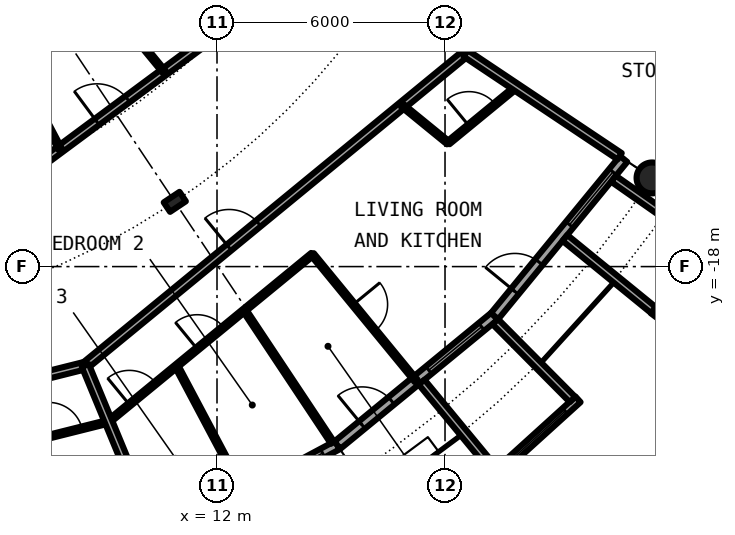
"""IFC4 building model, lengths in metres.
Left out: names, types, materials, properties, quantities, classifications, styles, units other than length and angle.
Written with IfcOpenShell. Run it as: python <this file> out.ifc"""

import sys

from ifc_helpers import new_model, si_unit, direction, frame, frame_2d, origin, origin_2d, place, context, subcontext, project, spatial, rectangle, circle, hollow_circle, i_section, extrude, element, fill, save


model = new_model("IFC4")
c1 = context("Model", 3, precision=1e-05, world=origin(), true_north=direction((0.0, 1.0)))
c2 = subcontext(c1, "Body", "Model", "MODEL_VIEW")
j1 = project(units=[si_unit("LENGTHUNIT", "METRE"), si_unit("PLANEANGLEUNIT", "RADIAN")], contexts=[c1])
p1 = place(None, origin())
s1 = spatial("IfcSite", under=j1, at=p1, CompositionType="ELEMENT")
p2 = place(p1, origin())
s2 = spatial("IfcBuilding", under=s1, at=p2, CompositionType="ELEMENT")
p3 = place(p2, frame((0.0, 0.0, 154.35)))
s3 = spatial("IfcBuildingStorey", under=s2, at=p3, CompositionType="ELEMENT", Elevation=154.35)
p4 = place(p3, frame((23.448, -15.667, 0.0), z_axis=(0.0, 0.0, 1.0), x_axis=(1.0, 0.0, 0.0)))
e1 = element("IfcColumn", 1, at=p4, inside=s3, PredefinedType="COLUMN", context=c2, shape_type="SweptSolid", body=[
    extrude(hollow_circle(Radius=0.406, WallThickness=0.04, at=origin_2d()), origin(), (0.0, 0.0, 1.0), 3.05),
])
p5 = place(p3, frame((10.889, -16.297, 0.0), z_axis=(0.0, 0.0, 1.0), x_axis=(0.55557023302, -0.831469612303, 0.0)))
e2 = element("IfcColumn", 2, at=p5, inside=s3, PredefinedType="COLUMN", context=c2, shape_type="SweptSolid", body=[
    extrude(i_section(OverallWidth=0.3, OverallDepth=0.5, WebThickness=0.014, FlangeThickness=0.028, FilletRadius=0.027, at=origin_2d()), origin(), (0.0, 0.0, 1.0), 3.05),
])
p6 = place(p3, frame((10.447, -25.222, 0.0), z_axis=(0.0, 0.0, 1.0), x_axis=(0.881915646801, 0.471407246368, 0.0)))
e3 = element("IfcWall", 3, at=p6, inside=s3, PredefinedType="SOLIDWALL", context=c2, shape_type="SweptSolid", body=[
    extrude(rectangle(XDim=5.352, YDim=0.25, at=frame_2d((2.676, 0.0))), origin(), (0.0, 0.0, 1.0), 2.7),
])
p7 = place(p6, frame((0.841, 0.0, 0.0)))
e4 = element("IfcOpeningElement", 4, at=p7, cuts=e3, PredefinedType="OPENING", context=c2, shape_type="SweptSolid", body=[
    extrude(rectangle(XDim=1.0, YDim=2.2, at=frame_2d((0.5, 1.1))), frame((0.0, 0.135, 0.0), z_axis=(0.0, -1.0, 0.0), x_axis=(1.0, 0.0, 0.0)), (0.0, 0.0, 1.0), 0.27),
])
p8 = place(p6, frame((3.111, 0.0, 0.3)))
e5 = element("IfcOpeningElement", 5, at=p8, cuts=e3, PredefinedType="OPENING", context=c2, shape_type="SweptSolid", body=[
    extrude(rectangle(XDim=1.8, YDim=2.1, at=frame_2d((0.9, 1.05))), frame((0.0, 0.135, 0.0), z_axis=(0.0, -1.0, 0.0), x_axis=(1.0, 0.0, 0.0)), (0.0, 0.0, 1.0), 0.27),
])
p9 = place(p3, frame((15.167, -22.699, 0.0), z_axis=(0.0, 0.0, 1.0), x_axis=(0.773019449054, 0.634382322723, 0.0)))
e6 = element("IfcWall", 6, at=p9, inside=s3, PredefinedType="SOLIDWALL", context=c2, shape_type="SweptSolid", body=[
    extrude(rectangle(XDim=5.352, YDim=0.25, at=frame_2d((2.676, 0.0))), origin(), (0.0, 0.0, 1.0), 2.7),
])
p10 = place(p9, frame((0.841, 0.0, 0.0)))
e7 = element("IfcOpeningElement", 7, at=p10, cuts=e6, PredefinedType="OPENING", context=c2, shape_type="SweptSolid", body=[
    extrude(rectangle(XDim=1.0, YDim=2.2, at=frame_2d((0.5, 1.1))), frame((0.0, 0.135, 0.0), z_axis=(0.0, -1.0, 0.0), x_axis=(1.0, 0.0, 0.0)), (0.0, 0.0, 1.0), 0.27),
])
p11 = place(p9, frame((3.111, 0.0, 0.3)))
e8 = element("IfcOpeningElement", 8, at=p11, cuts=e6, PredefinedType="OPENING", context=c2, shape_type="SweptSolid", body=[
    extrude(rectangle(XDim=1.8, YDim=2.1, at=frame_2d((0.9, 1.05))), frame((0.0, 0.135, 0.0), z_axis=(0.0, -1.0, 0.0), x_axis=(1.0, 0.0, 0.0)), (0.0, 0.0, 1.0), 0.27),
])
p12 = place(p3, frame((19.282, -23.503, -0.03), z_axis=(0.0, 0.0, 1.0), x_axis=(0.740998365753, 0.671506829416, 0.0)))
e9 = element("IfcWall", 9, at=p12, inside=s3, PredefinedType="SOLIDWALL", context=c2, shape_type="SweptSolid", body=[
    extrude(rectangle(XDim=2.993, YDim=0.2, at=frame_2d((1.497, 0.0))), origin(), (0.0, 0.0, 1.0), 2.73),
])
p13 = place(p12, frame((0.457, 0.0, 0.33)))
e10 = element("IfcOpeningElement", 10, at=p13, cuts=e9, PredefinedType="OPENING", context=c2, shape_type="SweptSolid", body=[
    extrude(circle(Radius=1.04, at=frame_2d((1.04, 1.04))), frame((0.0, 0.11, 0.0), z_axis=(0.0, -1.0, 0.0), x_axis=(1.0, 0.0, 0.0)), (0.0, 0.0, 1.0), 0.22),
])
p14 = place(p3, frame((17.384, -21.041, -0.03), z_axis=(0.0, 0.0, 1.0), x_axis=(0.63709551667, -0.770784861449, 0.0)))
e11 = element("IfcWall", 11, at=p14, inside=s3, PredefinedType="SOLIDWALL", context=c2, shape_type="SweptSolid", body=[
    extrude(rectangle(XDim=3.006, YDim=0.2, at=frame_2d((1.503, 0.0))), origin(), (0.0, 0.0, 1.0), 2.73),
])
p15 = place(p3, frame((19.323, -19.45, -0.03), z_axis=(0.0, 0.0, 1.0), x_axis=(0.704476739375, -0.709727076896, 0.0)))
e12 = element("IfcWall", 12, at=p15, inside=s3, PredefinedType="SOLIDWALL", context=c2, shape_type="SweptSolid", body=[
    extrude(rectangle(XDim=2.883, YDim=0.2, at=frame_2d((1.441, 0.0))), origin(), (0.0, 0.0, 1.0), 2.73),
])
p16 = place(p3, frame((19.304, -19.304, 0.0), z_axis=(0.0, 0.0, 1.0), x_axis=(0.634382322723, 0.773019449054, 0.0)))
e13 = element("IfcWall", 13, at=p16, inside=s3, PredefinedType="SOLIDWALL", context=c2, shape_type="SweptSolid", body=[
    extrude(rectangle(XDim=5.352, YDim=0.25, at=frame_2d((2.676, 0.0))), origin(), (0.0, 0.0, 1.0), 2.7),
])
p17 = place(p16, frame((0.841, 0.0, 0.0)))
e14 = element("IfcOpeningElement", 14, at=p17, cuts=e13, PredefinedType="OPENING", context=c2, shape_type="SweptSolid", body=[
    extrude(rectangle(XDim=1.0, YDim=2.2, at=frame_2d((0.5, 1.1))), frame((0.0, 0.135, 0.0), z_axis=(0.0, -1.0, 0.0), x_axis=(1.0, 0.0, 0.0)), (0.0, 0.0, 1.0), 0.27),
])
p18 = place(p16, frame((3.111, 0.0, 0.3)))
e15 = element("IfcOpeningElement", 15, at=p18, cuts=e13, PredefinedType="OPENING", context=c2, shape_type="SweptSolid", body=[
    extrude(rectangle(XDim=1.8, YDim=2.1, at=frame_2d((0.9, 1.05))), frame((0.0, 0.135, 0.0), z_axis=(0.0, -1.0, 0.0), x_axis=(1.0, 0.0, 0.0)), (0.0, 0.0, 1.0), 0.27),
])
p19 = place(p3, frame((23.497, -19.289, -0.03), z_axis=(0.0, 0.0, 1.0), x_axis=(0.602806268067, 0.797887588059, 0.0)))
e16 = element("IfcWall", 16, at=p19, inside=s3, PredefinedType="SOLIDWALL", context=c2, shape_type="SweptSolid", body=[
    extrude(rectangle(XDim=2.447, YDim=0.2, at=frame_2d((1.223, 0.0))), origin(), (0.0, 0.0, 1.0), 2.73),
])
p20 = place(p19, frame((0.183, 0.0, 0.33)))
e17 = element("IfcOpeningElement", 17, at=p20, cuts=e16, PredefinedType="OPENING", context=c2, shape_type="SweptSolid", body=[
    extrude(circle(Radius=1.04, at=frame_2d((1.04, 1.04))), frame((0.0, 0.11, 0.0), z_axis=(0.0, -1.0, 0.0), x_axis=(1.0, 0.0, 0.0)), (0.0, 0.0, 1.0), 0.22),
])
p21 = place(p3, frame((21.155, -17.246, -0.03), z_axis=(0.0, 0.0, 1.0), x_axis=(0.775179004516, -0.631741648902, 0.0)))
e18 = element("IfcWall", 18, at=p21, inside=s3, PredefinedType="SOLIDWALL", context=c2, shape_type="SweptSolid", body=[
    extrude(rectangle(XDim=3.006, YDim=0.2, at=frame_2d((1.503, 0.0))), origin(), (0.0, 0.0, 1.0), 2.73),
])
p22 = place(p3, frame((22.433, -15.688, -0.03), z_axis=(0.0, 0.0, 1.0), x_axis=(0.819373043115, -0.573260687834, 0.0)))
e19 = element("IfcWall", 19, at=p22, inside=s3, PredefinedType="SOLIDWALL", context=c2, shape_type="SweptSolid", body=[
    extrude(rectangle(XDim=2.925, YDim=0.2, at=frame_2d((1.463, 0.0))), origin(), (0.0, 0.0, 1.0), 2.73),
])
p23 = place(p3, frame((6.878, -22.649, 0.0), z_axis=(0.0, 0.0, 1.0), x_axis=(0.9700564467, 0.242879579658, 0.0)))
e20 = element("IfcWall", 20, at=p23, inside=s3, PredefinedType="PARTITIONING", context=c2, shape_type="SweptSolid", body=[
    extrude(rectangle(XDim=2.338, YDim=0.1, at=frame_2d((1.169, 0.0))), origin(), (0.0, 0.0, 1.0), 2.7),
])
p24 = place(p23, frame((0.719, 0.0, 0.0)))
e21 = element("IfcOpeningElement", 21, at=p24, cuts=e20, PredefinedType="OPENING", context=c2, shape_type="SweptSolid", body=[
    extrude(rectangle(XDim=0.9, YDim=2.3, at=frame_2d((0.45, 1.15))), frame((0.0, 0.06, 0.0), z_axis=(0.0, -1.0, 0.0), x_axis=(1.0, 0.0, 0.0)), (0.0, 0.0, 1.0), 0.12),
])
p25 = place(p3, frame((9.146, -22.081, 0.0), z_axis=(0.0, 0.0, 1.0), x_axis=(0.772956112865, 0.634459492469, 0.0)))
e22 = element("IfcWall", 22, at=p25, inside=s3, PredefinedType="PARTITIONING", context=c2, shape_type="SweptSolid", body=[
    extrude(rectangle(XDim=6.938, YDim=0.1, at=frame_2d((3.469, 0.0))), origin(), (0.0, 0.0, 1.0), 2.7),
])
p26 = place(p25, frame((3.018, 0.0, 0.0)))
e23 = element("IfcOpeningElement", 23, at=p26, cuts=e22, PredefinedType="OPENING", context=c2, shape_type="SweptSolid", body=[
    extrude(rectangle(XDim=0.9, YDim=2.3, at=frame_2d((0.45, 1.15))), frame((0.0, 0.06, 0.0), z_axis=(0.0, -1.0, 0.0), x_axis=(1.0, 0.0, 0.0)), (0.0, 0.0, 1.0), 0.12),
])
p27 = place(p25, frame((0.709, 0.0, 0.0)))
e24 = element("IfcOpeningElement", 24, at=p27, cuts=e22, PredefinedType="OPENING", context=c2, shape_type="SweptSolid", body=[
    extrude(rectangle(XDim=0.9, YDim=2.3, at=frame_2d((0.45, 1.15))), frame((0.0, 0.06, 0.0), z_axis=(0.0, -1.0, 0.0), x_axis=(1.0, 0.0, 0.0)), (0.0, 0.0, 1.0), 0.12),
])
p28 = place(p3, frame((18.087, -14.742, 0.0), z_axis=(0.0, 0.0, 1.0), x_axis=(0.77288890179, 0.634541366256, 0.0)))
e25 = element("IfcWall", 25, at=p28, inside=s3, PredefinedType="PARTITIONING", context=c2, shape_type="SweptSolid", body=[
    extrude(rectangle(XDim=2.313, YDim=0.1, at=frame_2d((1.157, 0.0))), origin(), (0.0, 0.0, 1.0), 2.7),
])
p29 = place(p28, frame((0.702, 0.0, 0.0)))
e26 = element("IfcOpeningElement", 26, at=p29, cuts=e25, PredefinedType="OPENING", context=c2, shape_type="SweptSolid", body=[
    extrude(rectangle(XDim=0.9, YDim=2.3, at=frame_2d((0.45, 1.15))), frame((0.0, 0.06, 0.0), z_axis=(0.0, -1.0, 0.0), x_axis=(1.0, 0.0, 0.0)), (0.0, 0.0, 1.0), 0.12),
])
p30 = place(p3, frame((18.542, -12.389, 0.0), z_axis=(0.0, 0.0, 1.0), x_axis=(0.465605550524, 0.884992356646, 0.0)))
e27 = element("IfcWall", 27, at=p30, inside=s3, PredefinedType="PARTITIONING", context=c2, shape_type="SweptSolid", body=[
    extrude(rectangle(XDim=1.643, YDim=0.2, at=frame_2d((0.821, 0.0))), origin(), (0.0, 0.0, 1.0), 2.7),
])
p31 = place(p3, frame((2.186, -22.193, 0.0), z_axis=(0.0, 0.0, 1.0), x_axis=(0.97003047456, 0.242983288366, 0.0)))
e28 = element("IfcWall", 28, at=p31, inside=s3, PredefinedType="PARTITIONING", context=c2, shape_type="SweptSolid", body=[
    extrude(rectangle(XDim=6.544, YDim=0.2, at=frame_2d((3.272, 0.0))), origin(), (0.0, 0.0, 1.0), 2.7),
])
p32 = place(p31, frame((1.681, 0.0, 0.0)))
e29 = element("IfcOpeningElement", 29, at=p32, cuts=e28, PredefinedType="OPENING", context=c2, shape_type="SweptSolid", body=[
    extrude(rectangle(XDim=1.0, YDim=2.3, at=frame_2d((0.5, 1.15))), frame((0.0, 0.11, 0.0), z_axis=(0.0, -1.0, 0.0), x_axis=(1.0, 0.0, 0.0)), (0.0, 0.0, 1.0), 0.22),
])
p33 = place(p3, frame((8.534, -20.603, 0.0), z_axis=(0.0, 0.0, 1.0), x_axis=(0.772983503654, 0.634426121056, 0.0)))
e30 = element("IfcWall", 30, at=p33, inside=s3, PredefinedType="PARTITIONING", context=c2, shape_type="SweptSolid", body=[
    extrude(rectangle(XDim=12.947, YDim=0.2, at=frame_2d((6.474, 0.0))), origin(), (0.0, 0.0, 1.0), 2.7),
])
p34 = place(p33, frame((4.895, 0.0, 0.0)))
e31 = element("IfcOpeningElement", 31, at=p34, cuts=e30, PredefinedType="OPENING", context=c2, shape_type="SweptSolid", body=[
    extrude(rectangle(XDim=1.0, YDim=2.3, at=frame_2d((0.5, 1.15))), frame((0.0, 0.11, 0.0), z_axis=(0.0, -1.0, 0.0), x_axis=(1.0, 0.0, 0.0)), (0.0, 0.0, 1.0), 0.22),
])
p35 = place(p3, frame((5.137, -16.938, 0.0), z_axis=(0.0, 0.0, 1.0), x_axis=(0.803229232922, 0.595670042371, 0.0)))
e32 = element("IfcWall", 32, at=p35, inside=s3, PredefinedType="PARTITIONING", context=c2, shape_type="SweptSolid", body=[
    extrude(rectangle(XDim=10.224, YDim=0.2, at=frame_2d((5.112, 0.0))), origin(), (0.0, 0.0, 1.0), 2.7),
])
p36 = place(p35, frame((4.612, 0.0, 0.0)))
e33 = element("IfcOpeningElement", 33, at=p36, cuts=e32, PredefinedType="OPENING", context=c2, shape_type="SweptSolid", body=[
    extrude(rectangle(XDim=1.0, YDim=2.3, at=frame_2d((0.5, 1.15))), frame((0.0, 0.11, 0.0), z_axis=(0.0, -1.0, 0.0), x_axis=(1.0, 0.0, 0.0)), (0.0, 0.0, 1.0), 0.22),
])
p37 = place(p3, frame((12.721, -19.147, 0.0), z_axis=(0.0, 0.0, 1.0), x_axis=(0.553609857728, -0.832776155654, 0.0)))
e34 = element("IfcWall", 34, at=p37, inside=s3, PredefinedType="PARTITIONING", context=c2, shape_type="SweptSolid", body=[
    extrude(rectangle(XDim=4.187, YDim=0.1, at=frame_2d((2.094, 0.0))), origin(), (0.0, 0.0, 1.0), 2.7),
])
p38 = place(p3, frame((4.908, -5.959, 0.0), z_axis=(0.0, 0.0, 1.0), x_axis=(0.636115614725, -0.771593756262, 0.0)))
e35 = element("IfcWall", 35, at=p38, inside=s3, PredefinedType="PARTITIONING", context=c2, shape_type="SweptSolid", body=[
    extrude(rectangle(XDim=8.967, YDim=0.1, at=frame_2d((4.483, 0.0))), origin(), (0.0, 0.0, 1.0), 2.7),
])
p39 = place(p38, frame((6.4, 0.0, 0.0)))
e36 = element("IfcOpeningElement", 36, at=p39, cuts=e35, PredefinedType="OPENING", context=c2, shape_type="SweptSolid", body=[
    extrude(rectangle(XDim=0.9, YDim=2.3, at=frame_2d((0.45, 1.15))), frame((0.0, 0.06, 0.0), z_axis=(0.0, -1.0, 0.0), x_axis=(1.0, 0.0, 0.0)), (0.0, 0.0, 1.0), 0.12),
])
p40 = place(p38, frame((1.917, 0.0, 0.0)))
e37 = element("IfcOpeningElement", 37, at=p40, cuts=e35, PredefinedType="OPENING", context=c2, shape_type="SweptSolid", body=[
    extrude(rectangle(XDim=0.9, YDim=2.3, at=frame_2d((0.45, 1.15))), frame((0.0, 0.06, 0.0), z_axis=(0.0, -1.0, 0.0), x_axis=(1.0, 0.0, 0.0)), (0.0, 0.0, 1.0), 0.12),
])
p41 = place(p3, frame((5.875, -11.126, 0.0), z_axis=(0.0, 0.0, 1.0), x_axis=(0.467030118529, -0.884241408432, 0.0)))
e38 = element("IfcWall", 38, at=p41, inside=s3, PredefinedType="PARTITIONING", context=c2, shape_type="SweptSolid", body=[
    extrude(rectangle(XDim=4.278, YDim=0.1, at=frame_2d((2.139, 0.0))), origin(), (0.0, 0.0, 1.0), 2.7),
])
p42 = place(p41, frame((1.689, 0.0, 0.0)))
e39 = element("IfcOpeningElement", 39, at=p42, cuts=e38, PredefinedType="OPENING", context=c2, shape_type="SweptSolid", body=[
    extrude(rectangle(XDim=0.9, YDim=2.3, at=frame_2d((0.45, 1.15))), frame((0.0, 0.06, 0.0), z_axis=(0.0, -1.0, 0.0), x_axis=(1.0, 0.0, 0.0)), (0.0, 0.0, 1.0), 0.12),
])
p43 = place(p3, frame((8.534, -20.603, 0.0), z_axis=(0.0, 0.0, 1.0), x_axis=(0.382651153718, -0.923892902104, 0.0)))
e40 = element("IfcWall", 40, at=p43, inside=s3, PredefinedType="PARTITIONING", context=c2, shape_type="SweptSolid", body=[
    extrude(rectangle(XDim=4.874, YDim=0.2, at=frame_2d((2.437, 0.0))), origin(), (0.0, 0.0, 1.0), 2.7),
])
p44 = place(p3, frame((10.934, -20.614, 0.0), z_axis=(0.0, 0.0, 1.0), x_axis=(0.468594334564, -0.883413464701, 0.0)))
e41 = element("IfcWall", 41, at=p44, inside=s3, PredefinedType="PARTITIONING", context=c2, shape_type="SweptSolid", body=[
    extrude(rectangle(XDim=3.841, YDim=0.1, at=frame_2d((1.92, 0.0))), origin(), (0.0, 0.0, 1.0), 2.7),
])
p45 = place(p3, frame((14.509, -17.679, 0.0), z_axis=(0.0, 0.0, 1.0), x_axis=(0.634342681687, -0.77305197897, 0.0)))
e42 = element("IfcWall", 42, at=p45, inside=s3, PredefinedType="PARTITIONING", context=c2, shape_type="SweptSolid", body=[
    extrude(rectangle(XDim=4.305, YDim=0.1, at=frame_2d((2.153, 0.0))), origin(), (0.0, 0.0, 1.0), 2.7),
])
p46 = place(p45, frame((1.703, 0.0, 0.0)))
e43 = element("IfcOpeningElement", 43, at=p46, cuts=e42, PredefinedType="OPENING", context=c2, shape_type="SweptSolid", body=[
    extrude(rectangle(XDim=0.9, YDim=2.3, at=frame_2d((0.45, 1.15))), frame((0.0, 0.06, 0.0), z_axis=(0.0, -1.0, 0.0), x_axis=(1.0, 0.0, 0.0)), (0.0, 0.0, 1.0), 0.12),
])
p47 = place(p3, frame((16.874, -13.758, 0.0), z_axis=(0.0, 0.0, 1.0), x_axis=(0.774869051393, -0.632121786679, 0.0)))
e44 = element("IfcWall", 44, at=p47, inside=s3, PredefinedType="PARTITIONING", context=c2, shape_type="SweptSolid", body=[
    extrude(rectangle(XDim=1.562, YDim=0.1, at=frame_2d((0.781, 0.0))), origin(), (0.0, 0.0, 1.0), 2.7),
])
p48 = place(p3, frame((18.542, -12.389, 0.0), z_axis=(0.0, 0.0, 1.0), x_axis=(0.831387096605, -0.55569370664, 0.0)))
e45 = element("IfcWall", 45, at=p48, inside=s3, PredefinedType="PARTITIONING", context=c2, shape_type="SweptSolid", body=[
    extrude(rectangle(XDim=4.875, YDim=0.2, at=frame_2d((2.438, 0.0))), origin(), (0.0, 0.0, 1.0), 2.7),
])
p49 = place(p8, origin())
e46 = element("IfcWindow", 46, at=p49, inside=s3, PartitioningType="SINGLE_PANEL", PredefinedType="WINDOW", context=c2, shape_type="SweptSolid", body=[
    extrude(rectangle(XDim=1.8, YDim=2.1, at=frame_2d((0.9, 1.05))), frame((0.0, 0.03, 0.0), z_axis=(0.0, -1.0, 0.0), x_axis=(1.0, 0.0, 0.0)), (0.0, 0.0, 1.0), 0.06),
])
fill(e5, e46)
p50 = place(p10, origin())
e47 = element("IfcDoor", 47, at=p50, inside=s3, OperationType="SINGLE_SWING_LEFT", PredefinedType="DOOR", context=c2, shape_type="SweptSolid", body=[
    extrude(rectangle(XDim=1.0, YDim=2.2, at=frame_2d((0.5, 1.1))), frame((0.0, 0.025, 0.0), z_axis=(0.0, -1.0, 0.0), x_axis=(1.0, 0.0, 0.0)), (0.0, 0.0, 1.0), 0.05),
])
fill(e7, e47)
p51 = place(p11, origin())
e48 = element("IfcWindow", 48, at=p51, inside=s3, PartitioningType="SINGLE_PANEL", PredefinedType="WINDOW", context=c2, shape_type="SweptSolid", body=[
    extrude(rectangle(XDim=1.8, YDim=2.1, at=frame_2d((0.9, 1.05))), frame((0.0, 0.03, 0.0), z_axis=(0.0, -1.0, 0.0), x_axis=(1.0, 0.0, 0.0)), (0.0, 0.0, 1.0), 0.06),
])
fill(e8, e48)
p52 = place(p13, origin())
e49 = element("IfcWindow", 49, at=p52, inside=s3, PartitioningType="SINGLE_PANEL", PredefinedType="WINDOW", context=c2, shape_type="SweptSolid", body=[
    extrude(circle(Radius=1.04, at=frame_2d((1.04, 1.04))), frame((0.0, 0.03, 0.0), z_axis=(0.0, -1.0, 0.0), x_axis=(1.0, 0.0, 0.0)), (0.0, 0.0, 1.0), 0.06),
])
fill(e10, e49)
p53 = place(p17, origin())
e50 = element("IfcDoor", 50, at=p53, inside=s3, OperationType="SINGLE_SWING_LEFT", PredefinedType="DOOR", context=c2, shape_type="SweptSolid", body=[
    extrude(rectangle(XDim=1.0, YDim=2.2, at=frame_2d((0.5, 1.1))), frame((0.0, 0.025, 0.0), z_axis=(0.0, -1.0, 0.0), x_axis=(1.0, 0.0, 0.0)), (0.0, 0.0, 1.0), 0.05),
])
fill(e14, e50)
p54 = place(p18, origin())
e51 = element("IfcWindow", 51, at=p54, inside=s3, PartitioningType="SINGLE_PANEL", PredefinedType="WINDOW", context=c2, shape_type="SweptSolid", body=[
    extrude(rectangle(XDim=1.8, YDim=2.1, at=frame_2d((0.9, 1.05))), frame((0.0, 0.03, 0.0), z_axis=(0.0, -1.0, 0.0), x_axis=(1.0, 0.0, 0.0)), (0.0, 0.0, 1.0), 0.06),
])
fill(e15, e51)
p55 = place(p24, origin())
e52 = element("IfcDoor", 52, at=p55, inside=s3, OperationType="SINGLE_SWING_LEFT", PredefinedType="DOOR", context=c2, shape_type="SweptSolid", body=[
    extrude(rectangle(XDim=0.9, YDim=2.3, at=frame_2d((0.45, 1.15))), frame((0.0, 0.025, 0.0), z_axis=(0.0, -1.0, 0.0), x_axis=(1.0, 0.0, 0.0)), (0.0, 0.0, 1.0), 0.05),
])
fill(e21, e52)
p56 = place(p34, origin())
e53 = element("IfcDoor", 53, at=p56, inside=s3, OperationType="SINGLE_SWING_LEFT", PredefinedType="DOOR", context=c2, shape_type="SweptSolid", body=[
    extrude(rectangle(XDim=1.0, YDim=2.3, at=frame_2d((0.5, 1.15))), frame((0.0, 0.025, 0.0), z_axis=(0.0, -1.0, 0.0), x_axis=(1.0, 0.0, 0.0)), (0.0, 0.0, 1.0), 0.05),
])
fill(e31, e53)
p57 = place(p29, origin())
e54 = element("IfcDoor", 54, at=p57, inside=s3, OperationType="SINGLE_SWING_LEFT", PredefinedType="DOOR", context=c2, shape_type="SweptSolid", body=[
    extrude(rectangle(XDim=0.9, YDim=2.3, at=frame_2d((0.45, 1.15))), frame((0.0, 0.025, 0.0), z_axis=(0.0, -1.0, 0.0), x_axis=(1.0, 0.0, 0.0)), (0.0, 0.0, 1.0), 0.05),
])
fill(e26, e54)
p58 = place(p46, origin())
e55 = element("IfcDoor", 55, at=p58, inside=s3, OperationType="SINGLE_SWING_RIGHT", PredefinedType="DOOR", context=c2, shape_type="SweptSolid", body=[
    extrude(rectangle(XDim=0.9, YDim=2.3, at=frame_2d((0.45, 1.15))), frame((0.0, 0.025, 0.0), z_axis=(0.0, -1.0, 0.0), x_axis=(1.0, 0.0, 0.0)), (0.0, 0.0, 1.0), 0.05),
])
fill(e43, e55)
p59 = place(p26, origin())
e56 = element("IfcDoor", 56, at=p59, inside=s3, OperationType="SINGLE_SWING_LEFT", PredefinedType="DOOR", context=c2, shape_type="SweptSolid", body=[
    extrude(rectangle(XDim=0.9, YDim=2.3, at=frame_2d((0.45, 1.15))), frame((0.0, 0.025, 0.0), z_axis=(0.0, -1.0, 0.0), x_axis=(1.0, 0.0, 0.0)), (0.0, 0.0, 1.0), 0.05),
])
fill(e23, e56)
p60 = place(p27, origin())
e57 = element("IfcDoor", 57, at=p60, inside=s3, OperationType="SINGLE_SWING_LEFT", PredefinedType="DOOR", context=c2, shape_type="SweptSolid", body=[
    extrude(rectangle(XDim=0.9, YDim=2.3, at=frame_2d((0.45, 1.15))), frame((0.0, 0.025, 0.0), z_axis=(0.0, -1.0, 0.0), x_axis=(1.0, 0.0, 0.0)), (0.0, 0.0, 1.0), 0.05),
])
fill(e24, e57)
p61 = place(p36, origin())
e58 = element("IfcDoor", 58, at=p61, inside=s3, OperationType="SINGLE_SWING_RIGHT", PredefinedType="DOOR", context=c2, shape_type="SweptSolid", body=[
    extrude(rectangle(XDim=1.0, YDim=2.3, at=frame_2d((0.5, 1.15))), frame((0.0, 0.025, 0.0), z_axis=(0.0, -1.0, 0.0), x_axis=(1.0, 0.0, 0.0)), (0.0, 0.0, 1.0), 0.05),
])
fill(e33, e58)
save(model, sys.argv[1])
